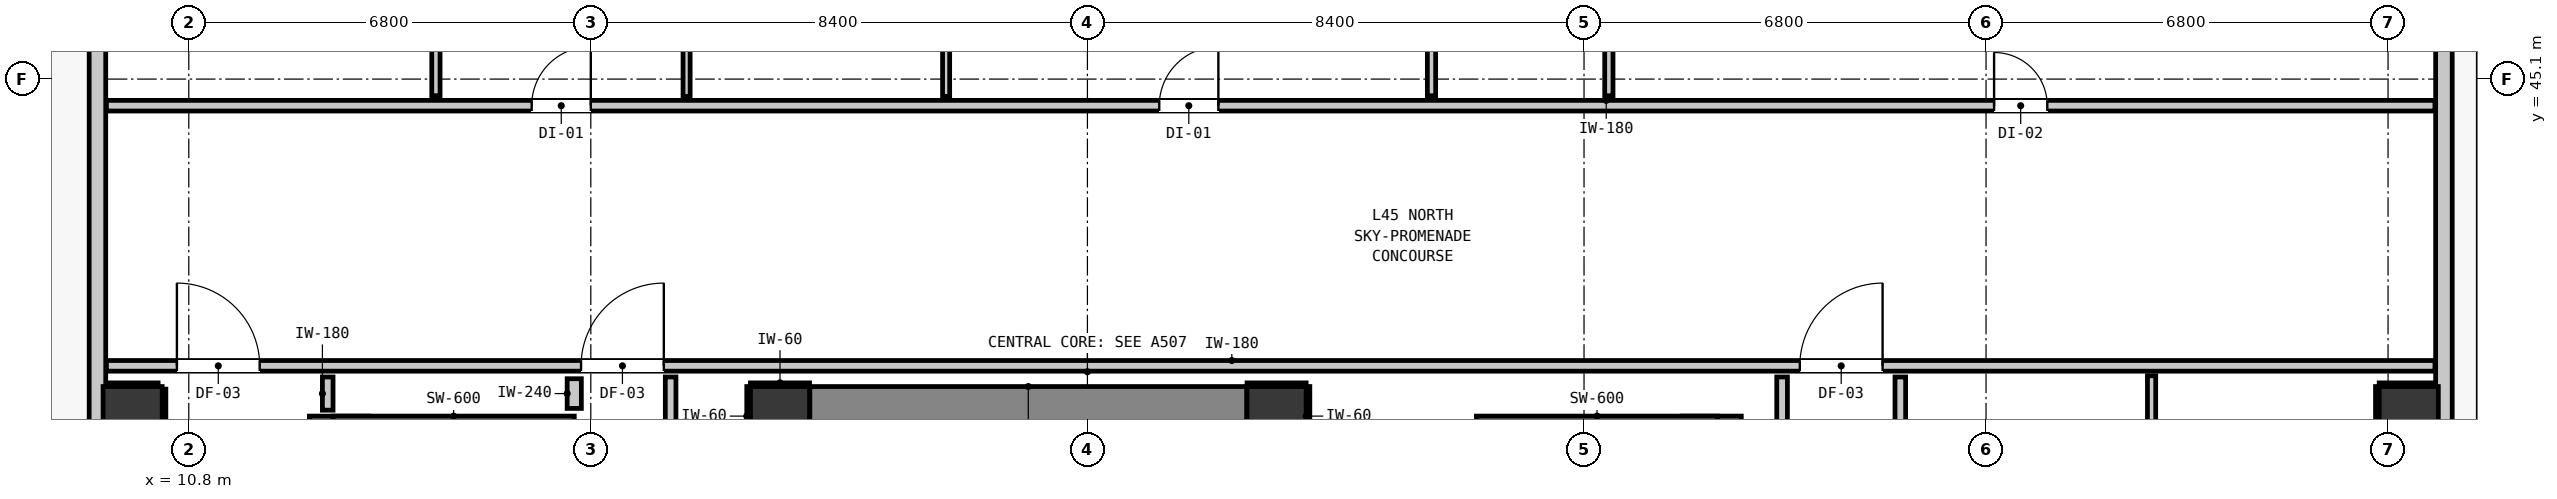
"""IFC4 building model, lengths in metres.
Left out: names, types, materials, properties, quantities, classifications, styles, units other than length and angle.
Written with IfcOpenShell. Run it as: python <this file> out.ifc"""

import sys

from ifc_helpers import new_model, si_unit, direction, frame, frame_2d, origin, origin_2d, place, context, subcontext, project, spatial, rectangle, extrude, element, fill, save


model = new_model("IFC4")
c1 = context("Model", 3, precision=1e-05, world=origin(), true_north=direction((0.0, 1.0)))
c2 = subcontext(c1, "Body", "Model", "MODEL_VIEW")
j1 = project(units=[si_unit("LENGTHUNIT", "METRE"), si_unit("PLANEANGLEUNIT", "RADIAN")], contexts=[c1])
p1 = place(None, origin())
s1 = spatial("IfcSite", under=j1, at=p1, CompositionType="ELEMENT")
p2 = place(p1, origin())
s2 = spatial("IfcBuilding", under=s1, at=p2, CompositionType="ELEMENT")
p3 = place(p2, frame((0.0, 0.0, 155.88)))
s3 = spatial("IfcBuildingStorey", under=s2, at=p3, CompositionType="ELEMENT", Elevation=155.88)
for number, where, z_axis, x_axis in (
    (1, (20.8, 39.4, 0.0), (0.0, 0.0, 1.0), (1.0, 0.0, 0.0)),
    (2, (29.2, 39.4, 0.0), (0.0, 0.0, 1.0), (1.0, 0.0, 0.0)),
):
    element("IfcColumn", number, at=place(p3, frame(where, z_axis=z_axis, x_axis=x_axis)), inside=s3, PredefinedType="COLUMN", context=c2, shape_type="SweptSolid", body=[
        extrude(rectangle(XDim=1.0, YDim=1.0, at=origin_2d()), origin(), (0.0, 0.0, 1.0), 3.32),
    ])
p4 = place(p3, frame((13.34, 31.205, 0.0), z_axis=(0.0, 0.0, 1.0), x_axis=(0.0, 1.0, 0.0)))
e3 = element("IfcWall", 3, at=p4, inside=s3, PredefinedType="SHEAR", context=c2, shape_type="SweptSolid", body=[
    extrude(rectangle(XDim=8.195, YDim=1.0, at=frame_2d((4.097, 0.0))), origin(), (0.0, 0.0, 1.0), 3.32),
])
p5 = place(p3, frame((13.24, 39.1, 0.0), z_axis=(0.0, 0.0, 1.0), x_axis=(1.0, 0.0, 0.0)))
e4 = element("IfcWall", 4, at=p5, inside=s3, PredefinedType="SHEAR", context=c2, shape_type="SweptSolid", body=[
    extrude(rectangle(XDim=4.08, YDim=0.6, at=frame_2d((2.04, 0.0))), origin(), (0.0, 0.0, 1.0), 3.32),
])
p6 = place(p3, frame((36.56, 31.205, 0.0), z_axis=(0.0, 0.0, 1.0), x_axis=(0.0, 1.0, 0.0)))
e5 = element("IfcWall", 5, at=p6, inside=s3, PredefinedType="SHEAR", context=c2, shape_type="SweptSolid", body=[
    extrude(rectangle(XDim=8.195, YDim=1.0, at=frame_2d((4.097, 0.0))), origin(), (0.0, 0.0, 1.0), 3.32),
])
p7 = place(p3, frame((32.58, 39.1, 0.0), z_axis=(0.0, 0.0, 1.0), x_axis=(1.0, 0.0, 0.0)))
e6 = element("IfcWall", 6, at=p7, inside=s3, PredefinedType="SHEAR", context=c2, shape_type="SweptSolid", body=[
    extrude(rectangle(XDim=4.08, YDim=0.6, at=frame_2d((2.04, 0.0))), origin(), (0.0, 0.0, 1.0), 3.32),
])
p8 = place(p3, frame((21.305, 39.4, 0.0), z_axis=(0.0, 0.0, 1.0), x_axis=(1.0, 0.0, 0.0)))
e7 = element("IfcWall", 7, at=p8, inside=s3, PredefinedType="SHEAR", context=c2, shape_type="SweptSolid", body=[
    extrude(rectangle(XDim=7.39, YDim=1.0, at=frame_2d((3.695, 0.0))), origin(), (0.0, 0.0, 1.0), 3.32),
])
for number, where, z_axis, x_axis in (
    (8, (9.85, 39.4, 0.0), (0.0, 0.0, 1.0), (1.0, 0.0, 0.0)),
    (9, (48.35, 39.4, 0.0), (0.0, 0.0, 1.0), (1.0, 0.0, 0.0)),
):
    element("IfcColumn", number, at=place(p3, frame(where, z_axis=z_axis, x_axis=x_axis)), inside=s3, PredefinedType="COLUMN", context=c2, shape_type="SweptSolid", body=[
        extrude(rectangle(XDim=1.0, YDim=1.0, at=origin_2d()), origin(), (0.0, 0.0, 1.0), 3.32),
    ])
p9 = place(p3, frame((9.255, 17.555, 0.0), z_axis=(0.0, 0.0, 1.0), x_axis=(0.0, 1.0, 0.0)))
e10 = element("IfcWall", 10, at=p9, inside=s3, PredefinedType="STANDARD", context=c2, shape_type="SweptSolid", body=[
    extrude(rectangle(XDim=32.29, YDim=0.28, at=frame_2d((16.145, 0.0))), origin(), (0.0, 0.0, 1.0), 3.08),
])
p10 = place(p9, frame((5.467, 0.0, 0.0)))
e11 = element("IfcOpeningElement", 11, at=p10, cuts=e10, PredefinedType="OPENING", context=c2, shape_type="SweptSolid", body=[
    extrude(rectangle(XDim=1.0, YDim=2.15, at=frame_2d((0.5, 1.075))), frame((0.0, 0.15, 0.0), z_axis=(0.0, -1.0, 0.0), x_axis=(1.0, 0.0, 0.0)), (0.0, 0.0, 1.0), 0.3),
])
p11 = place(p9, frame((30.727, 0.0, 0.85)))
e12 = element("IfcOpeningElement", 12, at=p11, cuts=e10, PredefinedType="OPENING", context=c2, shape_type="SweptSolid", body=[
    extrude(rectangle(XDim=1.1, YDim=2.05, at=frame_2d((0.55, 1.025))), frame((0.0, 0.15, 0.0), z_axis=(0.0, -1.0, 0.0), x_axis=(1.0, 0.0, 0.0)), (0.0, 0.0, 1.0), 0.3),
])
p12 = place(p3, frame((48.945, 49.845, 0.0), z_axis=(0.0, 0.0, 1.0), x_axis=(0.0, -1.0, 0.0)))
e13 = element("IfcWall", 13, at=p12, inside=s3, PredefinedType="STANDARD", context=c2, shape_type="SweptSolid", body=[
    extrude(rectangle(XDim=32.29, YDim=0.28, at=frame_2d((16.145, 0.0))), origin(), (0.0, 0.0, 1.0), 3.08),
])
p13 = place(p12, frame((0.904, 0.0, 0.0)))
e14 = element("IfcOpeningElement", 14, at=p13, cuts=e13, PredefinedType="OPENING", context=c2, shape_type="SweptSolid", body=[
    extrude(rectangle(XDim=1.0, YDim=2.15, at=frame_2d((0.5, 1.075))), frame((0.0, 0.15, 0.0), z_axis=(0.0, -1.0, 0.0), x_axis=(1.0, 0.0, 0.0)), (0.0, 0.0, 1.0), 0.3),
])
p14 = place(p12, frame((3.049, 0.0, 0.85)))
e15 = element("IfcOpeningElement", 15, at=p14, cuts=e13, PredefinedType="OPENING", context=c2, shape_type="SweptSolid", body=[
    extrude(rectangle(XDim=1.1, YDim=2.05, at=frame_2d((0.55, 1.025))), frame((0.0, 0.15, 0.0), z_axis=(0.0, -1.0, 0.0), x_axis=(1.0, 0.0, 0.0)), (0.0, 0.0, 1.0), 0.3),
])
p15 = place(p12, frame((21.311, 0.0, 0.85)))
e16 = element("IfcOpeningElement", 16, at=p15, cuts=e13, PredefinedType="OPENING", context=c2, shape_type="SweptSolid", body=[
    extrude(rectangle(XDim=1.1, YDim=2.05, at=frame_2d((0.55, 1.025))), frame((0.0, 0.15, 0.0), z_axis=(0.0, -1.0, 0.0), x_axis=(1.0, 0.0, 0.0)), (0.0, 0.0, 1.0), 0.3),
])
p16 = place(p12, frame((12.32, 0.0, 0.85)))
e17 = element("IfcOpeningElement", 17, at=p16, cuts=e13, PredefinedType="OPENING", context=c2, shape_type="SweptSolid", body=[
    extrude(rectangle(XDim=1.1, YDim=2.05, at=frame_2d((0.55, 1.025))), frame((0.0, 0.15, 0.0), z_axis=(0.0, -1.0, 0.0), x_axis=(1.0, 0.0, 0.0)), (0.0, 0.0, 1.0), 0.3),
])
p17 = place(p3, frame((9.407, 40.25, 0.0), z_axis=(0.0, 0.0, 1.0), x_axis=(1.0, 0.0, 0.0)))
e18 = element("IfcWall", 18, at=p17, inside=s3, PredefinedType="PARTITIONING", context=c2, shape_type="SweptSolid", body=[
    extrude(rectangle(XDim=39.386, YDim=0.18, at=frame_2d((19.693, 0.0))), origin(), (0.0, 0.0, 1.0), 3.08),
])
p18 = place(p17, frame((8.028, 0.0, 0.0)))
e19 = element("IfcOpeningElement", 19, at=p18, cuts=e18, PredefinedType="OPENING", context=c2, shape_type="SweptSolid", body=[
    extrude(rectangle(XDim=1.4, YDim=2.15, at=frame_2d((0.7, 1.075))), frame((0.0, 0.1, 0.0), z_axis=(0.0, -1.0, 0.0), x_axis=(1.0, 0.0, 0.0)), (0.0, 0.0, 1.0), 0.2),
])
p19 = place(p17, frame((1.192, 0.0, 0.0)))
e20 = element("IfcOpeningElement", 20, at=p19, cuts=e18, PredefinedType="OPENING", context=c2, shape_type="SweptSolid", body=[
    extrude(rectangle(XDim=1.4, YDim=2.15, at=frame_2d((0.7, 1.075))), frame((0.0, 0.1, 0.0), z_axis=(0.0, -1.0, 0.0), x_axis=(1.0, 0.0, 0.0)), (0.0, 0.0, 1.0), 0.2),
])
p20 = place(p17, frame((28.643, 0.0, 0.0)))
e21 = element("IfcOpeningElement", 21, at=p20, cuts=e18, PredefinedType="OPENING", context=c2, shape_type="SweptSolid", body=[
    extrude(rectangle(XDim=1.4, YDim=2.15, at=frame_2d((0.7, 1.075))), frame((0.0, 0.1, 0.0), z_axis=(0.0, -1.0, 0.0), x_axis=(1.0, 0.0, 0.0)), (0.0, 0.0, 1.0), 0.2),
])
p21 = place(p3, frame((9.407, 44.65, 0.0), z_axis=(0.0, 0.0, 1.0), x_axis=(1.0, 0.0, 0.0)))
e22 = element("IfcWall", 22, at=p21, inside=s3, PredefinedType="PARTITIONING", context=c2, shape_type="SweptSolid", body=[
    extrude(rectangle(XDim=39.386, YDim=0.18, at=frame_2d((19.693, 0.0))), origin(), (0.0, 0.0, 1.0), 3.08),
])
p22 = place(p21, frame((7.193, 0.0, 0.0)))
e23 = element("IfcOpeningElement", 23, at=p22, cuts=e22, PredefinedType="OPENING", context=c2, shape_type="SweptSolid", body=[
    extrude(rectangle(XDim=1.0, YDim=2.15, at=frame_2d((0.5, 1.075))), frame((0.0, 0.1, 0.0), z_axis=(0.0, -1.0, 0.0), x_axis=(1.0, 0.0, 0.0)), (0.0, 0.0, 1.0), 0.2),
])
p23 = place(p21, frame((17.808, 0.0, 0.0)))
e24 = element("IfcOpeningElement", 24, at=p23, cuts=e22, PredefinedType="OPENING", context=c2, shape_type="SweptSolid", body=[
    extrude(rectangle(XDim=1.0, YDim=2.15, at=frame_2d((0.5, 1.075))), frame((0.0, 0.1, 0.0), z_axis=(0.0, -1.0, 0.0), x_axis=(1.0, 0.0, 0.0)), (0.0, 0.0, 1.0), 0.2),
])
p24 = place(p21, frame((31.929, 0.0, 0.0)))
e25 = element("IfcOpeningElement", 25, at=p24, cuts=e22, PredefinedType="OPENING", context=c2, shape_type="SweptSolid", body=[
    extrude(rectangle(XDim=0.9, YDim=2.1, at=frame_2d((0.45, 1.05))), frame((0.0, 0.1, 0.0), z_axis=(0.0, -1.0, 0.0), x_axis=(1.0, 0.0, 0.0)), (0.0, 0.0, 1.0), 0.2),
])
p25 = place(p3, frame((17.32, 39.53, 0.0), z_axis=(0.0, 0.0, 1.0), x_axis=(0.0, 1.0, 0.0)))
e26 = element("IfcWall", 26, at=p25, inside=s3, PredefinedType="PARTITIONING", context=c2, shape_type="SweptSolid", body=[
    extrude(rectangle(XDim=0.502, YDim=0.24, at=frame_2d((0.251, 0.0))), origin(), (0.0, 0.0, 1.0), 3.08),
])
p26 = place(p3, frame((13.15, 39.5, 0.0), z_axis=(0.0, 0.0, 1.0), x_axis=(0.0, 1.0, 0.0)))
e27 = element("IfcWall", 27, at=p26, inside=s3, PredefinedType="PARTITIONING", context=c2, shape_type="SweptSolid", body=[
    extrude(rectangle(XDim=0.562, YDim=0.18, at=frame_2d((0.281, 0.0))), origin(), (0.0, 0.0, 1.0), 2.315),
])
p27 = place(p3, frame((18.95, 39.058, 0.0), z_axis=(0.0, 0.0, 1.0), x_axis=(0.0, 1.0, 0.0)))
e28 = element("IfcWall", 28, at=p27, inside=s3, PredefinedType="PARTITIONING", context=c2, shape_type="SweptSolid", body=[
    extrude(rectangle(XDim=1.004, YDim=0.18, at=frame_2d((0.502, 0.0))), origin(), (0.0, 0.0, 1.0), 3.08),
])
p28 = place(p3, frame((37.75, 21.368, 0.0), z_axis=(0.0, 0.0, 1.0), x_axis=(0.0, 1.0, 0.0)))
e29 = element("IfcWall", 29, at=p28, inside=s3, PredefinedType="PARTITIONING", context=c2, shape_type="SweptSolid", body=[
    extrude(rectangle(XDim=18.694, YDim=0.18, at=frame_2d((9.347, 0.0))), origin(), (0.0, 0.0, 1.0), 3.08),
])
p29 = place(p3, frame((39.75, 35.118, 0.0), z_axis=(0.0, 0.0, 1.0), x_axis=(0.0, 1.0, 0.0)))
e30 = element("IfcWall", 30, at=p29, inside=s3, PredefinedType="PARTITIONING", context=c2, shape_type="SweptSolid", body=[
    extrude(rectangle(XDim=4.944, YDim=0.18, at=frame_2d((2.472, 0.0))), origin(), (0.0, 0.0, 1.0), 3.08),
])
p30 = place(p3, frame((14.98, 44.818, 0.0), z_axis=(0.0, 0.0, 1.0), x_axis=(0.0, 1.0, 0.0)))
e31 = element("IfcWall", 31, at=p30, inside=s3, PredefinedType="PARTITIONING", context=c2, shape_type="SweptSolid", body=[
    extrude(rectangle(XDim=2.844, YDim=0.14, at=frame_2d((1.422, 0.0))), origin(), (0.0, 0.0, 1.0), 3.08),
])
p31 = place(p30, frame((0.995, 0.0, 0.0)))
e32 = element("IfcOpeningElement", 32, at=p31, cuts=e31, PredefinedType="OPENING", context=c2, shape_type="SweptSolid", body=[
    extrude(rectangle(XDim=0.86, YDim=2.02, at=frame_2d((0.43, 1.01))), frame((0.0, 0.08, 0.0), z_axis=(0.0, -1.0, 0.0), x_axis=(1.0, 0.0, 0.0)), (0.0, 0.0, 1.0), 0.16),
])
p32 = place(p3, frame((31.82, 44.818, 0.0), z_axis=(0.0, 0.0, 1.0), x_axis=(0.0, 1.0, 0.0)))
e33 = element("IfcWall", 33, at=p32, inside=s3, PredefinedType="PARTITIONING", context=c2, shape_type="SweptSolid", body=[
    extrude(rectangle(XDim=2.844, YDim=0.14, at=frame_2d((1.422, 0.0))), origin(), (0.0, 0.0, 1.0), 3.08),
])
p33 = place(p32, frame((0.975, 0.0, 0.0)))
e34 = element("IfcOpeningElement", 34, at=p33, cuts=e33, PredefinedType="OPENING", context=c2, shape_type="SweptSolid", body=[
    extrude(rectangle(XDim=0.9, YDim=2.1, at=frame_2d((0.45, 1.05))), frame((0.0, 0.08, 0.0), z_axis=(0.0, -1.0, 0.0), x_axis=(1.0, 0.0, 0.0)), (0.0, 0.0, 1.0), 0.16),
])
p34 = place(p3, frame((34.82, 44.818, 0.0), z_axis=(0.0, 0.0, 1.0), x_axis=(0.0, 1.0, 0.0)))
e35 = element("IfcWall", 35, at=p34, inside=s3, PredefinedType="PARTITIONING", context=c2, shape_type="SweptSolid", body=[
    extrude(rectangle(XDim=2.844, YDim=0.14, at=frame_2d((1.422, 0.0))), origin(), (0.0, 0.0, 1.0), 3.08),
])
p35 = place(p3, frame((44.0, 35.098, 0.0), z_axis=(0.0, 0.0, 1.0), x_axis=(0.0, 1.0, 0.0)))
e36 = element("IfcWall", 36, at=p35, inside=s3, PredefinedType="PARTITIONING", context=c2, shape_type="SweptSolid", body=[
    extrude(rectangle(XDim=4.984, YDim=0.14, at=frame_2d((2.492, 0.0))), origin(), (0.0, 0.0, 1.0), 3.08),
])
p36 = place(p3, frame((19.22, 44.808, 0.0), z_axis=(0.0, 0.0, 1.0), x_axis=(0.0, 1.0, 0.0)))
e37 = element("IfcWall", 37, at=p36, inside=s3, PredefinedType="PARTITIONING", context=c2, shape_type="SweptSolid", body=[
    extrude(rectangle(XDim=7.185, YDim=0.12, at=frame_2d((3.592, 0.0))), origin(), (0.0, 0.0, 1.0), 3.08),
])
p37 = place(p36, frame((3.067, 0.0, 0.0)))
e38 = element("IfcOpeningElement", 38, at=p37, cuts=e37, PredefinedType="OPENING", context=c2, shape_type="SweptSolid", body=[
    extrude(rectangle(XDim=0.9, YDim=2.1, at=frame_2d((0.45, 1.05))), frame((0.0, 0.07, 0.0), z_axis=(0.0, -1.0, 0.0), x_axis=(1.0, 0.0, 0.0)), (0.0, 0.0, 1.0), 0.14),
])
p38 = place(p3, frame((23.61, 44.808, 0.0), z_axis=(0.0, 0.0, 1.0), x_axis=(0.0, 1.0, 0.0)))
e39 = element("IfcWall", 39, at=p38, inside=s3, PredefinedType="PARTITIONING", context=c2, shape_type="SweptSolid", body=[
    extrude(rectangle(XDim=7.185, YDim=0.12, at=frame_2d((3.592, 0.0))), origin(), (0.0, 0.0, 1.0), 3.08),
])
for number, where, z_axis, x_axis in (
    (40, (20.3, 39.932, 0.0), (0.0, 0.0, 1.0), (1.0, 0.0, 0.0)),
    (41, (20.268, 38.9, 0.0), (0.0, 0.0, 1.0), (0.0, 1.0, 0.0)),
    (42, (28.7, 39.932, 0.0), (0.0, 0.0, 1.0), (1.0, 0.0, 0.0)),
    (43, (29.732, 38.9, 0.0), (0.0, 0.0, 1.0), (0.0, 1.0, 0.0)),
):
    element("IfcWall", number, at=place(p3, frame(where, z_axis=z_axis, x_axis=x_axis)), inside=s3, PredefinedType="PARTITIONING", context=c2, shape_type="SweptSolid", body=[
        extrude(rectangle(XDim=1.0, YDim=0.06, at=frame_2d((0.5, 0.0))), origin(), (0.0, 0.0, 1.0), 1.45),
    ])
p39 = place(p3, frame((9.41, 39.932, 0.0), z_axis=(0.0, 0.0, 1.0), x_axis=(1.0, 0.0, 0.0)))
e44 = element("IfcWall", 44, at=p39, inside=s3, PredefinedType="PARTITIONING", context=c2, shape_type="SweptSolid", body=[
    extrude(rectangle(XDim=0.871, YDim=0.06, at=frame_2d((0.436, 0.0))), origin(), (0.0, 0.0, 1.0), 1.45),
])
p40 = place(p3, frame((10.382, 38.9, 0.0), z_axis=(0.0, 0.0, 1.0), x_axis=(0.0, 1.0, 0.0)))
e45 = element("IfcWall", 45, at=p40, inside=s3, PredefinedType="PARTITIONING", context=c2, shape_type="SweptSolid", body=[
    extrude(rectangle(XDim=0.956, YDim=0.06, at=frame_2d((0.478, 0.0))), origin(), (0.0, 0.0, 1.0), 1.45),
])
p41 = place(p3, frame((47.85, 39.932, 0.0), z_axis=(0.0, 0.0, 1.0), x_axis=(1.0, 0.0, 0.0)))
e46 = element("IfcWall", 46, at=p41, inside=s3, PredefinedType="PARTITIONING", context=c2, shape_type="SweptSolid", body=[
    extrude(rectangle(XDim=0.94, YDim=0.06, at=frame_2d((0.47, 0.0))), origin(), (0.0, 0.0, 1.0), 1.45),
])
p42 = place(p3, frame((47.818, 38.9, 0.0), z_axis=(0.0, 0.0, 1.0), x_axis=(0.0, 1.0, 0.0)))
e47 = element("IfcWall", 47, at=p42, inside=s3, PredefinedType="PARTITIONING", context=c2, shape_type="SweptSolid", body=[
    extrude(rectangle(XDim=1.0, YDim=0.06, at=frame_2d((0.5, 0.0))), origin(), (0.0, 0.0, 1.0), 1.45),
])
p43 = place(p18, origin())
e48 = element("IfcDoor", 48, at=p43, inside=s3, OperationType="SINGLE_SWING_RIGHT", PredefinedType="DOOR", context=c2, shape_type="SweptSolid", body=[
    extrude(rectangle(XDim=1.4, YDim=2.15, at=frame_2d((0.7, 1.075))), frame((0.0, 0.025, 0.0), z_axis=(0.0, -1.0, 0.0), x_axis=(1.0, 0.0, 0.0)), (0.0, 0.0, 1.0), 0.05),
])
fill(e19, e48)
p44 = place(p19, origin())
e49 = element("IfcDoor", 49, at=p44, inside=s3, OperationType="SINGLE_SWING_LEFT", PredefinedType="DOOR", context=c2, shape_type="SweptSolid", body=[
    extrude(rectangle(XDim=1.4, YDim=2.15, at=frame_2d((0.7, 1.075))), frame((0.0, 0.025, 0.0), z_axis=(0.0, -1.0, 0.0), x_axis=(1.0, 0.0, 0.0)), (0.0, 0.0, 1.0), 0.05),
])
fill(e20, e49)
p45 = place(p20, origin())
e50 = element("IfcDoor", 50, at=p45, inside=s3, OperationType="SINGLE_SWING_RIGHT", PredefinedType="DOOR", context=c2, shape_type="SweptSolid", body=[
    extrude(rectangle(XDim=1.4, YDim=2.15, at=frame_2d((0.7, 1.075))), frame((0.0, 0.025, 0.0), z_axis=(0.0, -1.0, 0.0), x_axis=(1.0, 0.0, 0.0)), (0.0, 0.0, 1.0), 0.05),
])
fill(e21, e50)
p46 = place(p22, origin())
e51 = element("IfcDoor", 51, at=p46, inside=s3, OperationType="SINGLE_SWING_RIGHT", PredefinedType="DOOR", context=c2, shape_type="SweptSolid", body=[
    extrude(rectangle(XDim=1.0, YDim=2.15, at=frame_2d((0.5, 1.075))), frame((0.0, 0.025, 0.0), z_axis=(0.0, -1.0, 0.0), x_axis=(1.0, 0.0, 0.0)), (0.0, 0.0, 1.0), 0.05),
])
fill(e23, e51)
p47 = place(p23, origin())
e52 = element("IfcDoor", 52, at=p47, inside=s3, OperationType="SINGLE_SWING_RIGHT", PredefinedType="DOOR", context=c2, shape_type="SweptSolid", body=[
    extrude(rectangle(XDim=1.0, YDim=2.15, at=frame_2d((0.5, 1.075))), frame((0.0, 0.025, 0.0), z_axis=(0.0, -1.0, 0.0), x_axis=(1.0, 0.0, 0.0)), (0.0, 0.0, 1.0), 0.05),
])
fill(e24, e52)
p48 = place(p24, origin())
e53 = element("IfcDoor", 53, at=p48, inside=s3, OperationType="SINGLE_SWING_LEFT", PredefinedType="DOOR", context=c2, shape_type="SweptSolid", body=[
    extrude(rectangle(XDim=0.9, YDim=2.1, at=frame_2d((0.45, 1.05))), frame((0.0, 0.025, 0.0), z_axis=(0.0, -1.0, 0.0), x_axis=(1.0, 0.0, 0.0)), (0.0, 0.0, 1.0), 0.05),
])
fill(e25, e53)
save(model, sys.argv[1])
